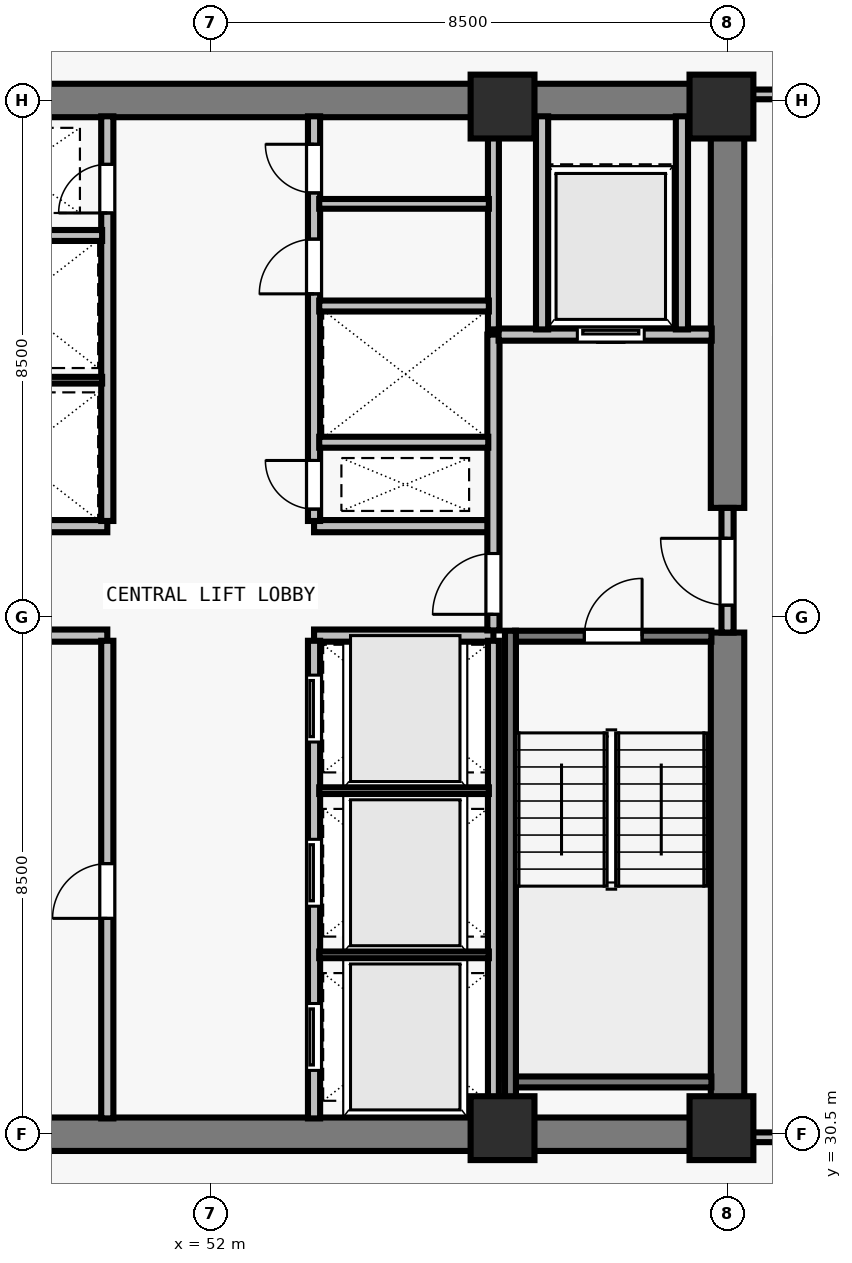
"""IFC4 building model, lengths in metres.
Left out: names, types, materials, properties, quantities, classifications, styles, units other than length and angle.
Written with IfcOpenShell. Run it as: python <this file> out.ifc"""

import sys

from ifc_helpers import new_model, si_unit, direction, frame, frame_2d, origin, origin_2d, place, context, subcontext, project, spatial, rectangle, extrude, element, fill, save


model = new_model("IFC4")
c1 = context("Model", 3, precision=1e-05, world=origin(), true_north=direction((0.0, 1.0)))
c2 = subcontext(c1, "Body", "Model", "MODEL_VIEW")
j1 = project(units=[si_unit("LENGTHUNIT", "METRE"), si_unit("PLANEANGLEUNIT", "RADIAN")], contexts=[c1])
p1 = place(None, origin())
s1 = spatial("IfcSite", under=j1, at=p1, CompositionType="ELEMENT")
p2 = place(p1, origin())
s2 = spatial("IfcBuilding", under=s1, at=p2, CompositionType="ELEMENT")
p3 = place(p2, frame((0.0, 0.0, 155.0)))
s3 = spatial("IfcBuildingStorey", under=s2, at=p3, CompositionType="ELEMENT", Elevation=155.0)
for number, where, z_axis, x_axis in (
    (1, (56.8, 30.6, 0.0), (0.0, 0.0, 1.0), (1.0, 0.0, 0.0)),
    (2, (60.4, 30.6, 0.0), (0.0, 0.0, 1.0), (1.0, 0.0, 0.0)),
    (3, (56.8, 47.4, 0.0), (0.0, 0.0, 1.0), (1.0, 0.0, 0.0)),
    (4, (60.4, 47.4, 0.0), (0.0, 0.0, 1.0), (1.0, 0.0, 0.0)),
):
    element("IfcColumn", number, at=place(p3, frame(where, z_axis=z_axis, x_axis=x_axis)), inside=s3, PredefinedType="COLUMN", context=c2, shape_type="SweptSolid", body=[
        extrude(rectangle(XDim=1.05, YDim=1.05, at=origin_2d()), origin(), (0.0, 0.0, 1.0), 3.5),
    ])
for number, where, z_axis, x_axis in (
    (5, (43.225, 30.5, 0.0), (0.0, 0.0, 1.0), (1.0, 0.0, 0.0)),
    (6, (43.225, 47.5, 0.0), (0.0, 0.0, 1.0), (1.0, 0.0, 0.0)),
):
    element("IfcWall", number, at=place(p3, frame(where, z_axis=z_axis, x_axis=x_axis)), inside=s3, PredefinedType="SHEAR", context=c2, shape_type="SweptSolid", body=[
        extrude(rectangle(XDim=17.55, YDim=0.55, at=frame_2d((8.775, 0.0))), origin(), (0.0, 0.0, 1.0), 3.28),
    ])
p4 = place(p3, frame((60.5, 30.765, 0.0), z_axis=(0.0, 0.0, 1.0), x_axis=(0.0, 1.0, 0.0)))
e7 = element("IfcWall", 7, at=p4, inside=s3, PredefinedType="SHEAR", context=c2, shape_type="SweptSolid", body=[
    extrude(rectangle(XDim=7.985, YDim=0.55, at=frame_2d((3.993, 0.0))), origin(), (0.0, 0.0, 1.0), 3.28),
])
p5 = place(p3, frame((60.5, 40.8, 0.0), z_axis=(0.0, 0.0, 1.0), x_axis=(0.0, 1.0, 0.0)))
e8 = element("IfcWall", 8, at=p5, inside=s3, PredefinedType="SHEAR", context=c2, shape_type="SweptSolid", body=[
    extrude(rectangle(XDim=6.435, YDim=0.55, at=frame_2d((3.218, 0.0))), origin(), (0.0, 0.0, 1.0), 3.28),
])
for number, where, z_axis, x_axis in (
    (9, (47.35, 38.7, 0.0), (0.0, 0.0, 1.0), (1.0, 0.0, 0.0)),
    (10, (47.35, 40.5, 0.0), (0.0, 0.0, 1.0), (1.0, 0.0, 0.0)),
    (11, (53.7, 38.7, 0.0), (0.0, 0.0, 1.0), (1.0, 0.0, 0.0)),
    (12, (53.7, 40.5, 0.0), (0.0, 0.0, 1.0), (1.0, 0.0, 0.0)),
):
    element("IfcWall", number, at=place(p3, frame(where, z_axis=z_axis, x_axis=x_axis)), inside=s3, PredefinedType="SOLIDWALL", context=c2, shape_type="SweptSolid", body=[
        extrude(rectangle(XDim=2.95, YDim=0.2, at=frame_2d((1.475, 0.0))), origin(), (0.0, 0.0, 1.0), 3.28),
    ])
p6 = place(p3, frame((50.3, 30.76, 0.0), z_axis=(0.0, 0.0, 1.0), x_axis=(0.0, 1.0, 0.0)))
e13 = element("IfcWall", 13, at=p6, inside=s3, PredefinedType="SOLIDWALL", context=c2, shape_type="SweptSolid", body=[
    extrude(rectangle(XDim=7.855, YDim=0.2, at=frame_2d((3.927, 0.0))), origin(), (0.0, 0.0, 1.0), 3.28),
])
p7 = place(p6, frame((3.29, 0.0, 0.0)))
e14 = element("IfcOpeningElement", 14, at=p7, cuts=e13, PredefinedType="OPENING", context=c2, shape_type="SweptSolid", body=[
    extrude(rectangle(XDim=0.9, YDim=2.12, at=frame_2d((0.45, 1.06))), frame((0.0, 0.11, 0.0), z_axis=(0.0, -1.0, 0.0), x_axis=(1.0, 0.0, 0.0)), (0.0, 0.0, 1.0), 0.22),
])
p8 = place(p3, frame((53.7, 30.76, 0.0), z_axis=(0.0, 0.0, 1.0), x_axis=(0.0, 1.0, 0.0)))
e15 = element("IfcWall", 15, at=p8, inside=s3, PredefinedType="SOLIDWALL", context=c2, shape_type="SweptSolid", body=[
    extrude(rectangle(XDim=7.855, YDim=0.2, at=frame_2d((3.927, 0.0))), origin(), (0.0, 0.0, 1.0), 3.28),
])
p9 = place(p8, frame((0.79, 0.0, 0.0)))
e16 = element("IfcOpeningElement", 16, at=p9, cuts=e15, PredefinedType="OPENING", context=c2, shape_type="SweptSolid", body=[
    extrude(rectangle(XDim=1.1, YDim=2.2, at=frame_2d((0.55, 1.1))), frame((0.0, 0.11, 0.0), z_axis=(0.0, -1.0, 0.0), x_axis=(1.0, 0.0, 0.0)), (0.0, 0.0, 1.0), 0.22),
])
p10 = place(p8, frame((3.49, 0.0, 0.0)))
e17 = element("IfcOpeningElement", 17, at=p10, cuts=e15, PredefinedType="OPENING", context=c2, shape_type="SweptSolid", body=[
    extrude(rectangle(XDim=1.1, YDim=2.2, at=frame_2d((0.55, 1.1))), frame((0.0, 0.11, 0.0), z_axis=(0.0, -1.0, 0.0), x_axis=(1.0, 0.0, 0.0)), (0.0, 0.0, 1.0), 0.22),
])
p11 = place(p8, frame((6.19, 0.0, 0.0)))
e18 = element("IfcOpeningElement", 18, at=p11, cuts=e15, PredefinedType="OPENING", context=c2, shape_type="SweptSolid", body=[
    extrude(rectangle(XDim=1.1, YDim=2.2, at=frame_2d((0.55, 1.1))), frame((0.0, 0.11, 0.0), z_axis=(0.0, -1.0, 0.0), x_axis=(1.0, 0.0, 0.0)), (0.0, 0.0, 1.0), 0.22),
])
p12 = place(p3, frame((50.3, 40.585, 0.0), z_axis=(0.0, 0.0, 1.0), x_axis=(0.0, 1.0, 0.0)))
e19 = element("IfcWall", 19, at=p12, inside=s3, PredefinedType="SOLIDWALL", context=c2, shape_type="SweptSolid", body=[
    extrude(rectangle(XDim=6.655, YDim=0.2, at=frame_2d((3.328, 0.0))), origin(), (0.0, 0.0, 1.0), 3.28),
])
p13 = place(p12, frame((5.065, 0.0, 0.0)))
e20 = element("IfcOpeningElement", 20, at=p13, cuts=e19, PredefinedType="OPENING", context=c2, shape_type="SweptSolid", body=[
    extrude(rectangle(XDim=0.8, YDim=2.08, at=frame_2d((0.4, 1.04))), frame((0.0, 0.11, 0.0), z_axis=(0.0, -1.0, 0.0), x_axis=(1.0, 0.0, 0.0)), (0.0, 0.0, 1.0), 0.22),
])
p14 = place(p3, frame((53.7, 40.585, 0.0), z_axis=(0.0, 0.0, 1.0), x_axis=(0.0, 1.0, 0.0)))
e21 = element("IfcWall", 21, at=p14, inside=s3, PredefinedType="SOLIDWALL", context=c2, shape_type="SweptSolid", body=[
    extrude(rectangle(XDim=6.655, YDim=0.2, at=frame_2d((3.328, 0.0))), origin(), (0.0, 0.0, 1.0), 3.28),
])
p15 = place(p14, frame((0.195, 0.0, 0.0)))
e22 = element("IfcOpeningElement", 22, at=p15, cuts=e21, PredefinedType="OPENING", context=c2, shape_type="SweptSolid", body=[
    extrude(rectangle(XDim=0.8, YDim=2.08, at=frame_2d((0.4, 1.04))), frame((0.0, 0.11, 0.0), z_axis=(0.0, -1.0, 0.0), x_axis=(1.0, 0.0, 0.0)), (0.0, 0.0, 1.0), 0.22),
])
p16 = place(p14, frame((3.735, 0.0, 0.0)))
e23 = element("IfcOpeningElement", 23, at=p16, cuts=e21, PredefinedType="OPENING", context=c2, shape_type="SweptSolid", body=[
    extrude(rectangle(XDim=0.9, YDim=2.12, at=frame_2d((0.45, 1.06))), frame((0.0, 0.11, 0.0), z_axis=(0.0, -1.0, 0.0), x_axis=(1.0, 0.0, 0.0)), (0.0, 0.0, 1.0), 0.22),
])
p17 = place(p14, frame((5.395, 0.0, 0.0)))
e24 = element("IfcOpeningElement", 24, at=p17, cuts=e21, PredefinedType="OPENING", context=c2, shape_type="SweptSolid", body=[
    extrude(rectangle(XDim=0.8, YDim=2.1, at=frame_2d((0.4, 1.05))), frame((0.0, 0.11, 0.0), z_axis=(0.0, -1.0, 0.0), x_axis=(1.0, 0.0, 0.0)), (0.0, 0.0, 1.0), 0.22),
])
p18 = place(p3, frame((60.5, 38.75, 0.0), z_axis=(0.0, 0.0, 1.0), x_axis=(0.0, 1.0, 0.0)))
e25 = element("IfcWall", 25, at=p18, inside=s3, PredefinedType="SOLIDWALL", context=c2, shape_type="SweptSolid", body=[
    extrude(rectangle(XDim=2.05, YDim=0.2, at=frame_2d((1.025, 0.0))), origin(), (0.0, 0.0, 1.0), 3.28),
])
p19 = place(p18, frame((0.45, 0.0, 0.0)))
e26 = element("IfcOpeningElement", 26, at=p19, cuts=e25, PredefinedType="OPENING", context=c2, shape_type="SweptSolid", body=[
    extrude(rectangle(XDim=1.1, YDim=2.15, at=frame_2d((0.55, 1.075))), frame((0.0, 0.11, 0.0), z_axis=(0.0, -1.0, 0.0), x_axis=(1.0, 0.0, 0.0)), (0.0, 0.0, 1.0), 0.22),
])
p20 = place(p3, frame((56.65, 38.785, 0.0), z_axis=(0.0, 0.0, 1.0), x_axis=(0.0, 1.0, 0.0)))
e27 = element("IfcWall", 27, at=p20, inside=s3, PredefinedType="SOLIDWALL", context=c2, shape_type="SweptSolid", body=[
    extrude(rectangle(XDim=4.865, YDim=0.2, at=frame_2d((2.433, 0.0))), origin(), (0.0, 0.0, 1.0), 3.28),
])
p21 = place(p20, frame((0.265, 0.0, 0.0)))
e28 = element("IfcOpeningElement", 28, at=p21, cuts=e27, PredefinedType="OPENING", context=c2, shape_type="SweptSolid", body=[
    extrude(rectangle(XDim=1.0, YDim=2.15, at=frame_2d((0.5, 1.075))), frame((0.0, 0.11, 0.0), z_axis=(0.0, -1.0, 0.0), x_axis=(1.0, 0.0, 0.0)), (0.0, 0.0, 1.0), 0.22),
])
p22 = place(p3, frame((56.735, 43.65, 0.0), z_axis=(0.0, 0.0, 1.0), x_axis=(1.0, 0.0, 0.0)))
e29 = element("IfcWall", 29, at=p22, inside=s3, PredefinedType="SOLIDWALL", context=c2, shape_type="SweptSolid", body=[
    extrude(rectangle(XDim=3.505, YDim=0.2, at=frame_2d((1.752, 0.0))), origin(), (0.0, 0.0, 1.0), 3.28),
])
p23 = place(p22, frame((1.295, 0.0, 0.0)))
e30 = element("IfcOpeningElement", 30, at=p23, cuts=e29, PredefinedType="OPENING", context=c2, shape_type="SweptSolid", body=[
    extrude(rectangle(XDim=1.1, YDim=2.2, at=frame_2d((0.55, 1.1))), frame((0.0, 0.11, 0.0), z_axis=(0.0, -1.0, 0.0), x_axis=(1.0, 0.0, 0.0)), (0.0, 0.0, 1.0), 0.22),
])
for number, where, z_axis, x_axis in (
    (31, (57.45, 43.735, 0.0), (0.0, 0.0, 1.0), (0.0, 1.0, 0.0)),
    (32, (59.75, 43.735, 0.0), (0.0, 0.0, 1.0), (0.0, 1.0, 0.0)),
):
    element("IfcWall", number, at=place(p3, frame(where, z_axis=z_axis, x_axis=x_axis)), inside=s3, PredefinedType="SOLIDWALL", context=c2, shape_type="SweptSolid", body=[
        extrude(rectangle(XDim=3.505, YDim=0.2, at=frame_2d((1.752, 0.0))), origin(), (0.0, 0.0, 1.0), 3.28),
    ])
p24 = place(p3, frame((56.65, 30.76, 0.0), z_axis=(0.0, 0.0, 1.0), x_axis=(0.0, 1.0, 0.0)))
e33 = element("IfcWall", 33, at=p24, inside=s3, PredefinedType="SOLIDWALL", context=c2, shape_type="SweptSolid", body=[
    extrude(rectangle(XDim=7.855, YDim=0.18, at=frame_2d((3.927, 0.0))), origin(), (0.0, 0.0, 1.0), 3.28),
])
for number, where, z_axis, x_axis in (
    (34, (53.785, 33.45, 0.0), (0.0, 0.0, 1.0), (1.0, 0.0, 0.0)),
    (35, (53.785, 36.15, 0.0), (0.0, 0.0, 1.0), (1.0, 0.0, 0.0)),
):
    element("IfcWall", number, at=place(p3, frame(where, z_axis=z_axis, x_axis=x_axis)), inside=s3, PredefinedType="PARTITIONING", context=c2, shape_type="SweptSolid", body=[
        extrude(rectangle(XDim=2.79, YDim=0.11, at=frame_2d((1.395, 0.0))), origin(), (0.0, 0.0, 1.0), 3.28),
    ])
p25 = place(p3, frame((47.435, 42.9, 0.0), z_axis=(0.0, 0.0, 1.0), x_axis=(1.0, 0.0, 0.0)))
e36 = element("IfcWall", 36, at=p25, inside=s3, PredefinedType="PARTITIONING", context=c2, shape_type="SweptSolid", body=[
    extrude(rectangle(XDim=2.78, YDim=0.11, at=frame_2d((1.39, 0.0))), origin(), (0.0, 0.0, 1.0), 3.28),
])
p26 = place(p3, frame((47.425, 45.28, 0.0), z_axis=(0.0, 0.0, 1.0), x_axis=(1.0, 0.0, 0.0)))
e37 = element("IfcWall", 37, at=p26, inside=s3, PredefinedType="SOLIDWALL", context=c2, shape_type="SweptSolid", body=[
    extrude(rectangle(XDim=2.79, YDim=0.18, at=frame_2d((1.395, 0.0))), origin(), (0.0, 0.0, 1.0), 3.28),
])
p27 = place(p3, frame((56.65, 43.735, 0.0), z_axis=(0.0, 0.0, 1.0), x_axis=(0.0, 1.0, 0.0)))
e38 = element("IfcWall", 38, at=p27, inside=s3, PredefinedType="SOLIDWALL", context=c2, shape_type="SweptSolid", body=[
    extrude(rectangle(XDim=3.505, YDim=0.18, at=frame_2d((1.752, 0.0))), origin(), (0.0, 0.0, 1.0), 3.28),
])
p28 = place(p3, frame((53.785, 41.88, 0.0), z_axis=(0.0, 0.0, 1.0), x_axis=(1.0, 0.0, 0.0)))
e39 = element("IfcWall", 39, at=p28, inside=s3, PredefinedType="SOLIDWALL", context=c2, shape_type="SweptSolid", body=[
    extrude(rectangle(XDim=2.78, YDim=0.18, at=frame_2d((1.39, 0.0))), origin(), (0.0, 0.0, 1.0), 3.28),
])
p29 = place(p3, frame((53.785, 44.12, 0.0), z_axis=(0.0, 0.0, 1.0), x_axis=(1.0, 0.0, 0.0)))
e40 = element("IfcWall", 40, at=p29, inside=s3, PredefinedType="SOLIDWALL", context=c2, shape_type="SweptSolid", body=[
    extrude(rectangle(XDim=2.79, YDim=0.18, at=frame_2d((1.395, 0.0))), origin(), (0.0, 0.0, 1.0), 3.28),
])
p30 = place(p3, frame((53.785, 45.8, 0.0), z_axis=(0.0, 0.0, 1.0), x_axis=(1.0, 0.0, 0.0)))
e41 = element("IfcWall", 41, at=p30, inside=s3, PredefinedType="PARTITIONING", context=c2, shape_type="SweptSolid", body=[
    extrude(rectangle(XDim=2.79, YDim=0.16, at=frame_2d((1.395, 0.0))), origin(), (0.0, 0.0, 1.0), 3.28),
])
p31 = place(p3, frame((60.765, 30.45, 0.0), z_axis=(0.0, 0.0, 1.0), x_axis=(1.0, 0.0, 0.0)))
e42 = element("IfcWall", 42, at=p31, inside=s3, PredefinedType="PARTITIONING", context=c2, shape_type="SweptSolid", body=[
    extrude(rectangle(XDim=3.085, YDim=0.16, at=frame_2d((1.542, 0.0))), origin(), (0.0, 0.0, 1.0), 3.28),
])
p32 = place(p3, frame((60.765, 47.6, 0.0), z_axis=(0.0, 0.0, 1.0), x_axis=(1.0, 0.0, 0.0)))
e43 = element("IfcWall", 43, at=p32, inside=s3, PredefinedType="PARTITIONING", context=c2, shape_type="SweptSolid", body=[
    extrude(rectangle(XDim=3.02, YDim=0.16, at=frame_2d((1.51, 0.0))), origin(), (0.0, 0.0, 1.0), 3.28),
])
p33 = place(p3, frame((57.005, 38.69, 0.0), z_axis=(0.0, 0.0, 1.0), x_axis=(1.0, 0.0, 0.0)))
e44 = element("IfcWall", 44, at=p33, inside=s3, PredefinedType="SOLIDWALL", context=c2, shape_type="SweptSolid", body=[
    extrude(rectangle(XDim=3.23, YDim=0.18, at=frame_2d((1.615, 0.0))), origin(), (0.0, 0.0, 1.0), 3.28),
])
p34 = place(p33, frame((1.14, 0.0, 0.0)))
e45 = element("IfcOpeningElement", 45, at=p34, cuts=e44, PredefinedType="OPENING", context=c2, shape_type="SweptSolid", body=[
    extrude(rectangle(XDim=0.95, YDim=2.15, at=frame_2d((0.475, 1.075))), frame((0.0, 0.1, 0.0), z_axis=(0.0, -1.0, 0.0), x_axis=(1.0, 0.0, 0.0)), (0.0, 0.0, 1.0), 0.2),
])
p35 = place(p3, frame((57.005, 31.36, 0.0), z_axis=(0.0, 0.0, 1.0), x_axis=(1.0, 0.0, 0.0)))
e46 = element("IfcWall", 46, at=p35, inside=s3, PredefinedType="SOLIDWALL", context=c2, shape_type="SweptSolid", body=[
    extrude(rectangle(XDim=3.23, YDim=0.18, at=frame_2d((1.615, 0.0))), origin(), (0.0, 0.0, 1.0), 3.28),
])
p36 = place(p3, frame((56.93, 38.78, 0.0), z_axis=(0.0, 0.0, 1.0), x_axis=(0.0, -1.0, 0.0)))
e47 = element("IfcWall", 47, at=p36, inside=s3, PredefinedType="SOLIDWALL", context=c2, shape_type="SweptSolid", body=[
    extrude(rectangle(XDim=8.017, YDim=0.18, at=frame_2d((4.009, 0.0))), origin(), (0.0, 0.0, 1.0), 3.28),
])
p37 = place(p19, origin())
e48 = element("IfcDoor", 48, at=p37, inside=s3, OperationType="SINGLE_SWING_RIGHT", PredefinedType="DOOR", context=c2, shape_type="SweptSolid", body=[
    extrude(rectangle(XDim=1.1, YDim=2.15, at=frame_2d((0.55, 1.075))), frame((0.0, 0.025, 0.0), z_axis=(0.0, -1.0, 0.0), x_axis=(1.0, 0.0, 0.0)), (0.0, 0.0, 1.0), 0.05),
])
fill(e26, e48)
p38 = place(p21, origin())
e49 = element("IfcDoor", 49, at=p38, inside=s3, OperationType="SINGLE_SWING_LEFT", PredefinedType="DOOR", context=c2, shape_type="SweptSolid", body=[
    extrude(rectangle(XDim=1.0, YDim=2.15, at=frame_2d((0.5, 1.075))), frame((0.0, 0.025, 0.0), z_axis=(0.0, -1.0, 0.0), x_axis=(1.0, 0.0, 0.0)), (0.0, 0.0, 1.0), 0.05),
])
fill(e28, e49)
p39 = place(p23, origin())
e50 = element("IfcDoor", 50, at=p39, inside=s3, OperationType="SLIDING_TO_LEFT", PredefinedType="DOOR", context=c2, shape_type="SweptSolid", body=[
    extrude(rectangle(XDim=1.1, YDim=2.2, at=frame_2d((0.55, 1.1))), frame((0.0, 0.025, 0.0), z_axis=(0.0, -1.0, 0.0), x_axis=(1.0, 0.0, 0.0)), (0.0, 0.0, 1.0), 0.05),
])
fill(e30, e50)
p40 = place(p7, origin())
e51 = element("IfcDoor", 51, at=p40, inside=s3, OperationType="SINGLE_SWING_LEFT", PredefinedType="DOOR", context=c2, shape_type="SweptSolid", body=[
    extrude(rectangle(XDim=0.9, YDim=2.12, at=frame_2d((0.45, 1.06))), frame((0.0, 0.025, 0.0), z_axis=(0.0, -1.0, 0.0), x_axis=(1.0, 0.0, 0.0)), (0.0, 0.0, 1.0), 0.05),
])
fill(e14, e51)
p41 = place(p9, origin())
e52 = element("IfcDoor", 52, at=p41, inside=s3, OperationType="SLIDING_TO_LEFT", PredefinedType="DOOR", context=c2, shape_type="SweptSolid", body=[
    extrude(rectangle(XDim=1.1, YDim=2.2, at=frame_2d((0.55, 1.1))), frame((0.0, 0.025, 0.0), z_axis=(0.0, -1.0, 0.0), x_axis=(1.0, 0.0, 0.0)), (0.0, 0.0, 1.0), 0.05),
])
fill(e16, e52)
p42 = place(p10, origin())
e53 = element("IfcDoor", 53, at=p42, inside=s3, OperationType="SLIDING_TO_LEFT", PredefinedType="DOOR", context=c2, shape_type="SweptSolid", body=[
    extrude(rectangle(XDim=1.1, YDim=2.2, at=frame_2d((0.55, 1.1))), frame((0.0, 0.025, 0.0), z_axis=(0.0, -1.0, 0.0), x_axis=(1.0, 0.0, 0.0)), (0.0, 0.0, 1.0), 0.05),
])
fill(e17, e53)
p43 = place(p11, origin())
e54 = element("IfcDoor", 54, at=p43, inside=s3, OperationType="SLIDING_TO_LEFT", PredefinedType="DOOR", context=c2, shape_type="SweptSolid", body=[
    extrude(rectangle(XDim=1.1, YDim=2.2, at=frame_2d((0.55, 1.1))), frame((0.0, 0.025, 0.0), z_axis=(0.0, -1.0, 0.0), x_axis=(1.0, 0.0, 0.0)), (0.0, 0.0, 1.0), 0.05),
])
fill(e18, e54)
p44 = place(p13, origin())
e55 = element("IfcDoor", 55, at=p44, inside=s3, OperationType="SINGLE_SWING_LEFT", PredefinedType="DOOR", context=c2, shape_type="SweptSolid", body=[
    extrude(rectangle(XDim=0.8, YDim=2.08, at=frame_2d((0.4, 1.04))), frame((0.0, 0.025, 0.0), z_axis=(0.0, -1.0, 0.0), x_axis=(1.0, 0.0, 0.0)), (0.0, 0.0, 1.0), 0.05),
])
fill(e20, e55)
p45 = place(p15, origin())
e56 = element("IfcDoor", 56, at=p45, inside=s3, OperationType="SINGLE_SWING_RIGHT", PredefinedType="DOOR", context=c2, shape_type="SweptSolid", body=[
    extrude(rectangle(XDim=0.8, YDim=2.08, at=frame_2d((0.4, 1.04))), frame((0.0, 0.025, 0.0), z_axis=(0.0, -1.0, 0.0), x_axis=(1.0, 0.0, 0.0)), (0.0, 0.0, 1.0), 0.05),
])
fill(e22, e56)
p46 = place(p16, origin())
e57 = element("IfcDoor", 57, at=p46, inside=s3, OperationType="SINGLE_SWING_LEFT", PredefinedType="DOOR", context=c2, shape_type="SweptSolid", body=[
    extrude(rectangle(XDim=0.9, YDim=2.12, at=frame_2d((0.45, 1.06))), frame((0.0, 0.025, 0.0), z_axis=(0.0, -1.0, 0.0), x_axis=(1.0, 0.0, 0.0)), (0.0, 0.0, 1.0), 0.05),
])
fill(e23, e57)
p47 = place(p17, origin())
e58 = element("IfcDoor", 58, at=p47, inside=s3, OperationType="SINGLE_SWING_RIGHT", PredefinedType="DOOR", context=c2, shape_type="SweptSolid", body=[
    extrude(rectangle(XDim=0.8, YDim=2.1, at=frame_2d((0.4, 1.05))), frame((0.0, 0.025, 0.0), z_axis=(0.0, -1.0, 0.0), x_axis=(1.0, 0.0, 0.0)), (0.0, 0.0, 1.0), 0.05),
])
fill(e24, e58)
p48 = place(p34, origin())
e59 = element("IfcDoor", 59, at=p48, inside=s3, OperationType="SINGLE_SWING_RIGHT", PredefinedType="DOOR", context=c2, shape_type="SweptSolid", body=[
    extrude(rectangle(XDim=0.95, YDim=2.15, at=frame_2d((0.475, 1.075))), frame((0.0, 0.025, 0.0), z_axis=(0.0, -1.0, 0.0), x_axis=(1.0, 0.0, 0.0)), (0.0, 0.0, 1.0), 0.05),
])
fill(e45, e59)
save(model, sys.argv[1])
